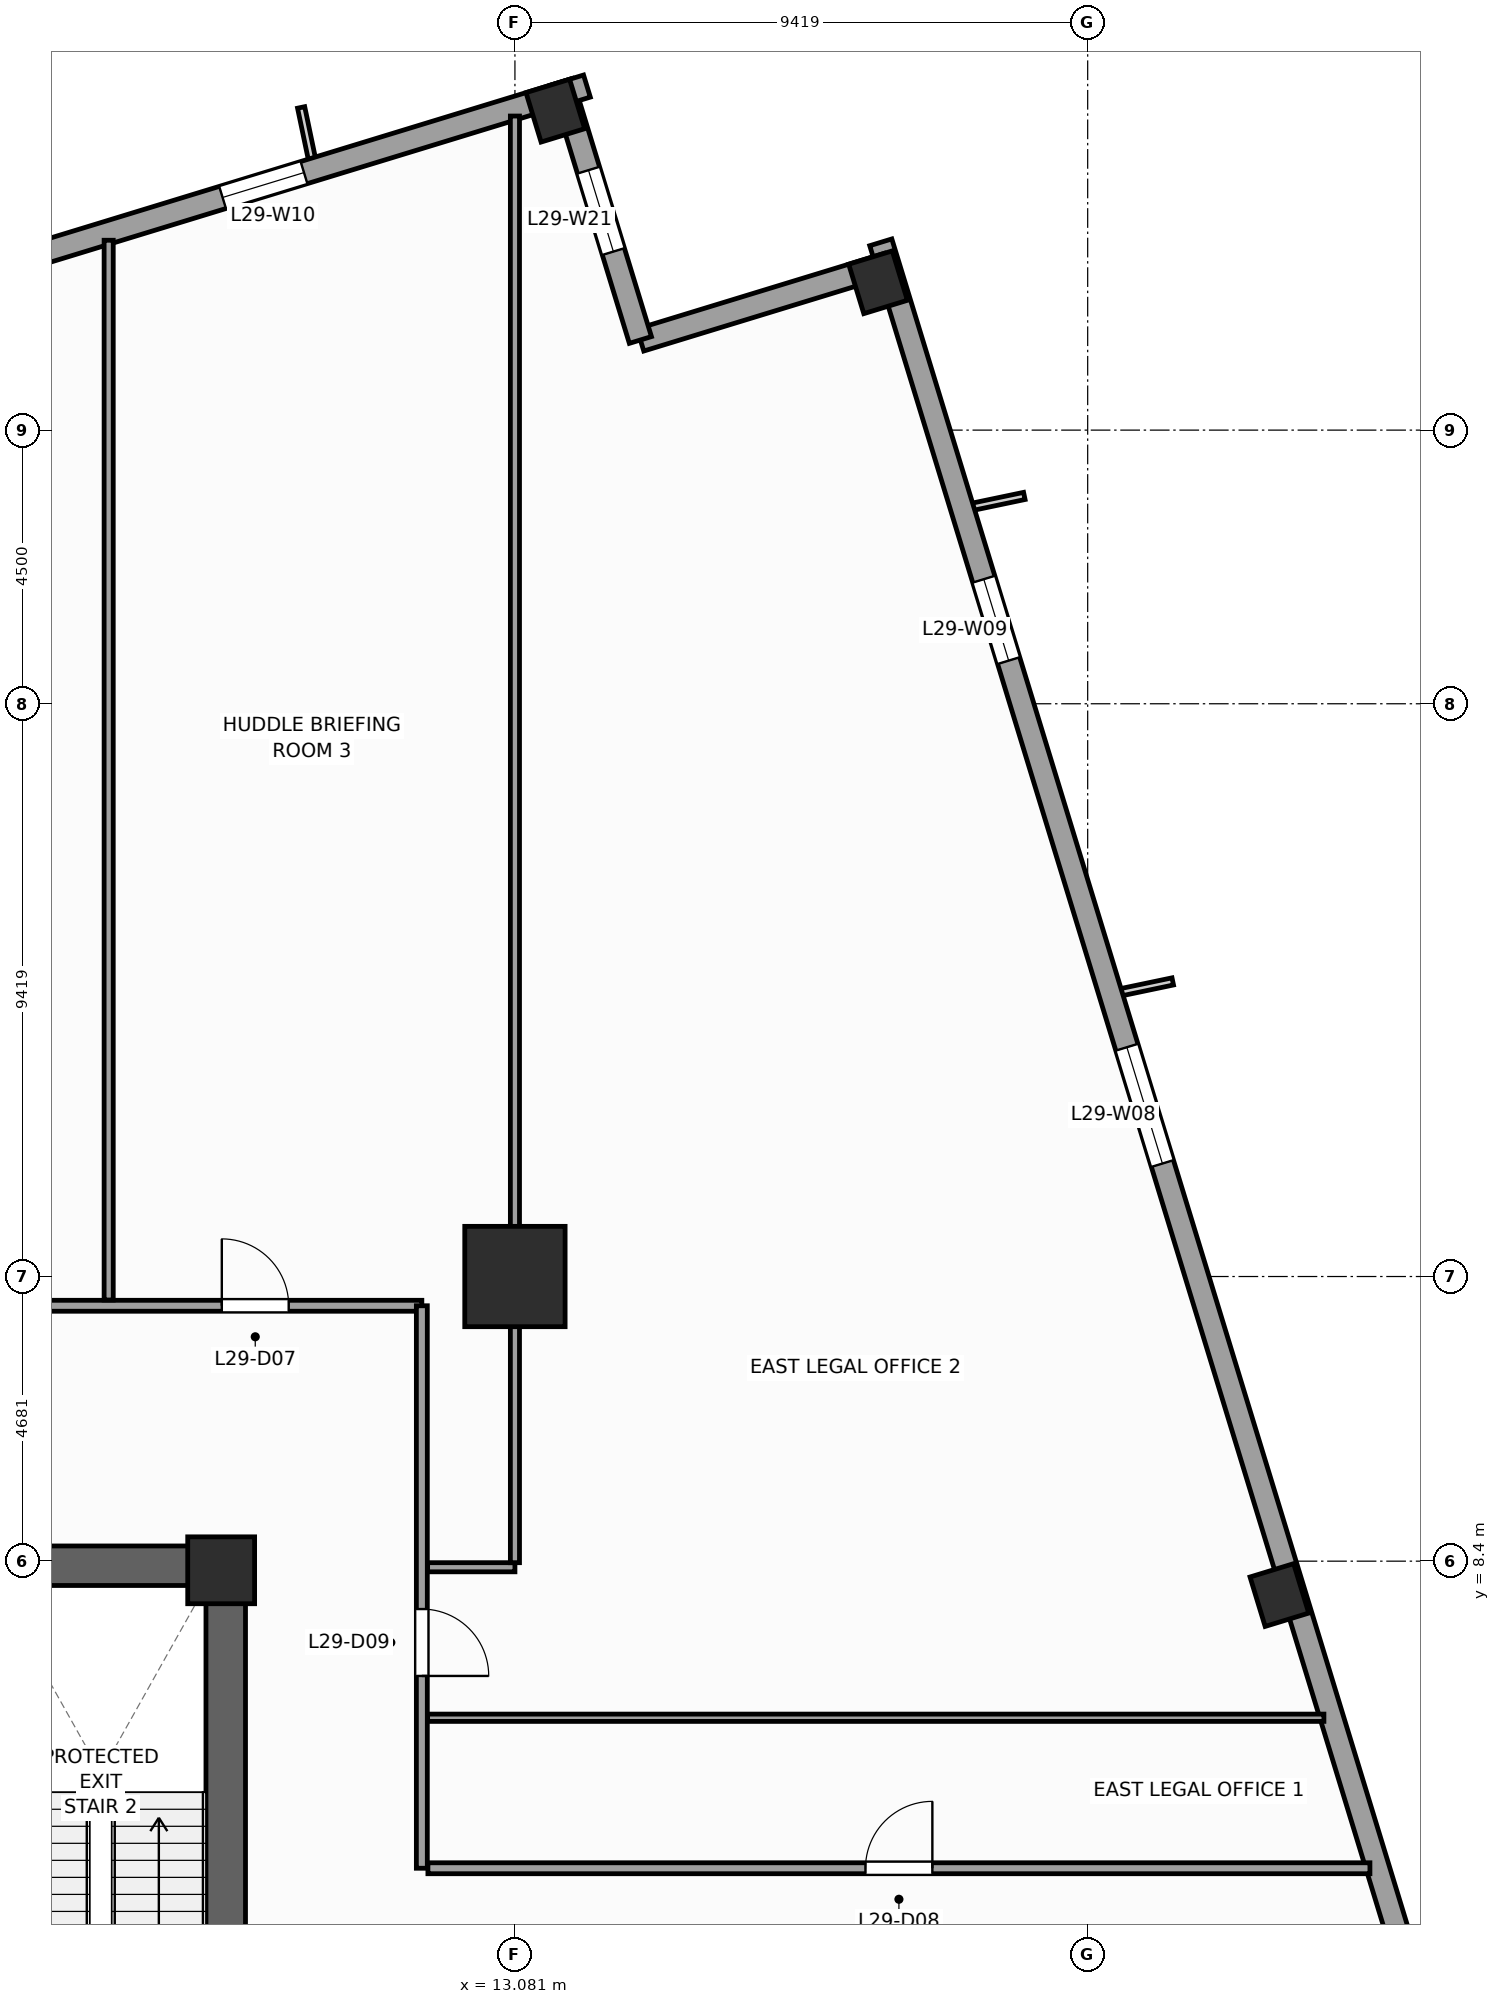
"""IFC4 building model, lengths in metres.
Left out: names, types, materials, properties, quantities, classifications, styles, units other than length and angle.
Written with IfcOpenShell. Run it as: python <this file> out.ifc"""

import sys

from ifc_helpers import new_model, si_unit, direction, frame, frame_2d, origin, origin_2d, place, context, subcontext, project, spatial, rectangle, extrude, source, transform, mapped, element, fill, save


model = new_model("IFC4")
c1 = context("Model", 3, precision=1e-05, world=origin(), true_north=direction((0.0, 1.0)))
c2 = subcontext(c1, "Body", "Model", "MODEL_VIEW")
j1 = project(units=[si_unit("LENGTHUNIT", "METRE"), si_unit("PLANEANGLEUNIT", "RADIAN")], contexts=[c1])
p1 = place(None, origin())
s1 = spatial("IfcSite", under=j1, at=p1, CompositionType="ELEMENT")
p2 = place(p1, origin())
s2 = spatial("IfcBuilding", under=s1, at=p2, CompositionType="ELEMENT")
p3 = place(p2, frame((0.0, 0.0, 123.2)))
s3 = spatial("IfcBuildingStorey", under=s2, at=p3, CompositionType="ELEMENT", Elevation=123.2)
p4 = place(p3, frame((-8.65, 8.325, 0.0), z_axis=(0.0, 0.0, 1.0), x_axis=(1.0, 0.0, 0.0)))
e1 = element("IfcWall", 1, at=p4, inside=s3, PredefinedType="SHEAR", context=c2, shape_type="SweptSolid", body=[
    extrude(rectangle(XDim=17.3, YDim=0.65, at=frame_2d((8.65, 0.0))), origin(), (0.0, 0.0, 1.0), 4.0),
])
p5 = place(p3, frame((8.325, -8.0, 0.0), z_axis=(0.0, 0.0, 1.0), x_axis=(0.0, 1.0, 0.0)))
e2 = element("IfcWall", 2, at=p5, inside=s3, PredefinedType="SHEAR", context=c2, shape_type="SweptSolid", body=[
    extrude(rectangle(XDim=16.0, YDim=0.65, at=frame_2d((8.0, 0.0))), origin(), (0.0, 0.0, 1.0), 4.0),
])
p6 = place(p5, frame((4.69, 0.0, 0.0)))
e3 = element("IfcOpeningElement", 3, at=p6, cuts=e2, PredefinedType="OPENING", context=c2, shape_type="SweptSolid", body=[
    extrude(rectangle(XDim=1.3, YDim=2.2, at=frame_2d((0.65, 1.1))), frame((0.0, 0.335, 0.0), z_axis=(0.0, -1.0, 0.0), x_axis=(1.0, 0.0, 0.0)), (0.0, 0.0, 1.0), 0.67),
])
m1 = source(origin(), c2, "Body", "SweptSolid", [
    extrude(rectangle(XDim=1.1, YDim=1.1, at=origin_2d()), origin(), (0.0, 0.0, 1.0), 4.0),
])
p7 = place(p3, frame((8.25, 8.25, 0.0), z_axis=(0.0, 0.0, 1.0), x_axis=(1.0, 0.0, 0.0)))
e4 = element("IfcColumn", 4, at=p7, inside=s3, PredefinedType="PILASTER", context=c2, shape_type="MappedRepresentation", body=[
    mapped(m1, transform((0.0, 0.0, 0.0), scale=1.0)),
])
m2 = source(origin(), c2, "Body", "SweptSolid", [
    extrude(rectangle(XDim=1.65, YDim=1.65, at=origin_2d()), origin(), (0.0, 0.0, 1.0), 4.0),
])
p8 = place(p3, frame((13.081, 13.081, 0.0), z_axis=(0.0, 0.0, 1.0), x_axis=(1.0, 0.0, 0.0)))
e5 = element("IfcColumn", 5, at=p8, inside=s3, PredefinedType="COLUMN", context=c2, shape_type="MappedRepresentation", body=[
    mapped(m2, transform((0.0, 0.0, 0.0), scale=1.0)),
])
m3 = source(origin(), c2, "Body", "SweptSolid", [
    extrude(rectangle(XDim=0.75, YDim=0.85, at=origin_2d()), origin(), (0.0, 0.0, 1.0), 4.0),
])
for number, where, z_axis, x_axis in (
    (6, (25.653, 7.843, 0.0), (0.0, 0.0, 1.0), (0.956, 0.292, 0.0)),
    (7, (19.052, 29.431, 0.0), (0.0, 0.0, 1.0), (0.956, 0.292, 0.0)),
    (8, (13.746, 32.253, 0.0), (0.0, 0.0, 1.0), (0.956, 0.292, 0.0)),
):
    element("IfcColumn", number, at=place(p3, frame(where, z_axis=z_axis, x_axis=x_axis)), inside=s3, PredefinedType="COLUMN", context=c2, shape_type="MappedRepresentation", body=[
        mapped(m3, transform((0.0, 0.0, 0.0), scale=1.0)),
    ])
p9 = place(p3, frame((32.658, -14.265, 0.0), z_axis=(0.0, 0.0, 1.0), x_axis=(-0.292373127906, 0.956304320851, 0.0)))
e9 = element("IfcWall", 9, at=p9, inside=s3, PredefinedType="STANDARD", context=c2, shape_type="SweptSolid", body=[
    extrude(rectangle(XDim=46.38, YDim=0.38, at=frame_2d((23.19, 0.0))), origin(), (0.0, 0.0, 1.0), 3.14),
])
p10 = place(p9, frame((4.865, 0.0, 0.51)))
e10 = element("IfcOpeningElement", 10, at=p10, cuts=e9, PredefinedType="OPENING", context=c2, shape_type="SweptSolid", body=[
    extrude(rectangle(XDim=1.4, YDim=2.4, at=frame_2d((0.7, 1.2))), frame((0.0, 0.2, 0.0), z_axis=(0.0, -1.0, 0.0), x_axis=(1.0, 0.0, 0.0)), (0.0, 0.0, 1.0), 0.4),
])
p11 = place(p9, frame((12.45, 0.0, 0.51)))
e11 = element("IfcOpeningElement", 11, at=p11, cuts=e9, PredefinedType="OPENING", context=c2, shape_type="SweptSolid", body=[
    extrude(rectangle(XDim=2.0, YDim=2.4, at=frame_2d((1.0, 1.2))), frame((0.0, 0.2, 0.0), z_axis=(0.0, -1.0, 0.0), x_axis=(1.0, 0.0, 0.0)), (0.0, 0.0, 1.0), 0.4),
])
p12 = place(p9, frame((30.538, 0.0, 0.51)))
e12 = element("IfcOpeningElement", 12, at=p12, cuts=e9, PredefinedType="OPENING", context=c2, shape_type="SweptSolid", body=[
    extrude(rectangle(XDim=2.0, YDim=2.4, at=frame_2d((1.0, 1.2))), frame((0.0, 0.2, 0.0), z_axis=(0.0, -1.0, 0.0), x_axis=(1.0, 0.0, 0.0)), (0.0, 0.0, 1.0), 0.4),
])
p13 = place(p9, frame((39.187, 0.0, 0.51)))
e13 = element("IfcOpeningElement", 13, at=p13, cuts=e9, PredefinedType="OPENING", context=c2, shape_type="SweptSolid", body=[
    extrude(rectangle(XDim=1.4, YDim=2.4, at=frame_2d((0.7, 1.2))), frame((0.0, 0.2, 0.0), z_axis=(0.0, -1.0, 0.0), x_axis=(1.0, 0.0, 0.0)), (0.0, 0.0, 1.0), 0.4),
])
p14 = place(p3, frame((19.208, 29.725, 0.0), z_axis=(0.0, 0.0, 1.0), x_axis=(-0.956312764915, -0.292345507338, 0.0)))
e14 = element("IfcWall", 14, at=p14, inside=s3, PredefinedType="STANDARD", context=c2, shape_type="SweptSolid", body=[
    extrude(rectangle(XDim=4.25, YDim=0.38, at=frame_2d((2.125, 0.0))), origin(), (0.0, 0.0, 1.0), 3.74),
])
p15 = place(p3, frame((15.144, 28.482, 0.0), z_axis=(0.0, 0.0, 1.0), x_axis=(-0.292373601522, 0.956304176051, 0.0)))
e15 = element("IfcWall", 15, at=p15, inside=s3, PredefinedType="STANDARD", context=c2, shape_type="SweptSolid", body=[
    extrude(rectangle(XDim=4.44, YDim=0.38, at=frame_2d((2.22, 0.0))), origin(), (0.0, 0.0, 1.0), 3.04),
])
p16 = place(p15, frame((1.52, 0.0, 0.51)))
e16 = element("IfcOpeningElement", 16, at=p16, cuts=e15, PredefinedType="OPENING", context=c2, shape_type="SweptSolid", body=[
    extrude(rectangle(XDim=1.4, YDim=2.4, at=frame_2d((0.7, 1.2))), frame((0.0, 0.2, 0.0), z_axis=(0.0, -1.0, 0.0), x_axis=(1.0, 0.0, 0.0)), (0.0, 0.0, 1.0), 0.4),
])
p17 = place(p3, frame((14.265, 32.658, 0.0), z_axis=(0.0, 0.0, 1.0), x_axis=(-0.956304320851, -0.292373127906, 0.0)))
e17 = element("IfcWall", 17, at=p17, inside=s3, PredefinedType="STANDARD", context=c2, shape_type="SweptSolid", body=[
    extrude(rectangle(XDim=46.38, YDim=0.38, at=frame_2d((23.19, 0.0))), origin(), (0.0, 0.0, 1.0), 3.14),
])
p18 = place(p17, frame((29.115, 0.0, 0.0)))
e18 = element("IfcOpeningElement", 18, at=p18, cuts=e17, PredefinedType="OPENING", context=c2, shape_type="SweptSolid", body=[
    extrude(rectangle(XDim=1.05, YDim=2.25, at=frame_2d((0.525, 1.125))), frame((0.0, 0.2, 0.0), z_axis=(0.0, -1.0, 0.0), x_axis=(1.0, 0.0, 0.0)), (0.0, 0.0, 1.0), 0.4),
])
p19 = place(p17, frame((4.865, 0.0, 0.51)))
e19 = element("IfcOpeningElement", 19, at=p19, cuts=e17, PredefinedType="OPENING", context=c2, shape_type="SweptSolid", body=[
    extrude(rectangle(XDim=1.4, YDim=2.4, at=frame_2d((0.7, 1.2))), frame((0.0, 0.2, 0.0), z_axis=(0.0, -1.0, 0.0), x_axis=(1.0, 0.0, 0.0)), (0.0, 0.0, 1.0), 0.4),
])
p20 = place(p17, frame((12.45, 0.0, 0.51)))
e20 = element("IfcOpeningElement", 20, at=p20, cuts=e17, PredefinedType="OPENING", context=c2, shape_type="SweptSolid", body=[
    extrude(rectangle(XDim=2.0, YDim=2.4, at=frame_2d((1.0, 1.2))), frame((0.0, 0.2, 0.0), z_axis=(0.0, -1.0, 0.0), x_axis=(1.0, 0.0, 0.0)), (0.0, 0.0, 1.0), 0.4),
])
p21 = place(p17, frame((20.512, 0.0, 0.51)))
e21 = element("IfcOpeningElement", 21, at=p21, cuts=e17, PredefinedType="OPENING", context=c2, shape_type="SweptSolid", body=[
    extrude(rectangle(XDim=2.0, YDim=2.4, at=frame_2d((1.0, 1.2))), frame((0.0, 0.2, 0.0), z_axis=(0.0, -1.0, 0.0), x_axis=(1.0, 0.0, 0.0)), (0.0, 0.0, 1.0), 0.4),
])
p22 = place(p17, frame((31.288, 0.0, 0.51)))
e22 = element("IfcOpeningElement", 22, at=p22, cuts=e17, PredefinedType="OPENING", context=c2, shape_type="SweptSolid", body=[
    extrude(rectangle(XDim=2.0, YDim=2.4, at=frame_2d((1.0, 1.2))), frame((0.0, 0.2, 0.0), z_axis=(0.0, -1.0, 0.0), x_axis=(1.0, 0.0, 0.0)), (0.0, 0.0, 1.0), 0.4),
])
p23 = place(p17, frame((39.187, 0.0, 0.51)))
e23 = element("IfcOpeningElement", 23, at=p23, cuts=e17, PredefinedType="OPENING", context=c2, shape_type="SweptSolid", body=[
    extrude(rectangle(XDim=1.4, YDim=2.4, at=frame_2d((0.7, 1.2))), frame((0.0, 0.2, 0.0), z_axis=(0.0, -1.0, 0.0), x_axis=(1.0, 0.0, 0.0)), (0.0, 0.0, 1.0), 0.4),
])
p24 = place(p3, frame((-10.45, 12.6, 0.0), z_axis=(0.0, 0.0, 1.0), x_axis=(1.0, 0.0, 0.0)))
e24 = element("IfcWall", 24, at=p24, inside=s3, PredefinedType="PARTITIONING", context=c2, shape_type="SweptSolid", body=[
    extrude(rectangle(XDim=22.0, YDim=0.18, at=frame_2d((11.0, 0.0))), origin(), (0.0, 0.0, 1.0), 3.74),
])
p25 = place(p24, frame((4.839, 0.0, 0.0)))
e25 = element("IfcOpeningElement", 25, at=p25, cuts=e24, PredefinedType="OPENING", context=c2, shape_type="SweptSolid", body=[
    extrude(rectangle(XDim=1.1, YDim=2.2, at=frame_2d((0.55, 1.1))), frame((0.0, 0.1, 0.0), z_axis=(0.0, -1.0, 0.0), x_axis=(1.0, 0.0, 0.0)), (0.0, 0.0, 1.0), 0.2),
])
p26 = place(p24, frame((13.1, 0.0, 0.0)))
e26 = element("IfcOpeningElement", 26, at=p26, cuts=e24, PredefinedType="OPENING", context=c2, shape_type="SweptSolid", body=[
    extrude(rectangle(XDim=1.1, YDim=2.2, at=frame_2d((0.55, 1.1))), frame((0.0, 0.1, 0.0), z_axis=(0.0, -1.0, 0.0), x_axis=(1.0, 0.0, 0.0)), (0.0, 0.0, 1.0), 0.2),
])
p27 = place(p24, frame((18.71, 0.0, 0.0)))
e27 = element("IfcOpeningElement", 27, at=p27, cuts=e24, PredefinedType="OPENING", context=c2, shape_type="SweptSolid", body=[
    extrude(rectangle(XDim=1.1, YDim=2.2, at=frame_2d((0.55, 1.1))), frame((0.0, 0.1, 0.0), z_axis=(0.0, -1.0, 0.0), x_axis=(1.0, 0.0, 0.0)), (0.0, 0.0, 1.0), 0.2),
])
p28 = place(p3, frame((11.55, 3.35, 0.0), z_axis=(0.0, 0.0, 1.0), x_axis=(0.0, 1.0, 0.0)))
e28 = element("IfcWall", 28, at=p28, inside=s3, PredefinedType="PARTITIONING", context=c2, shape_type="SweptSolid", body=[
    extrude(rectangle(XDim=9.25, YDim=0.18, at=frame_2d((4.625, 0.0))), origin(), (0.0, 0.0, 1.0), 3.74),
])
p29 = place(p28, frame((3.163, 0.0, 0.0)))
e29 = element("IfcOpeningElement", 29, at=p29, cuts=e28, PredefinedType="OPENING", context=c2, shape_type="SweptSolid", body=[
    extrude(rectangle(XDim=1.1, YDim=2.2, at=frame_2d((0.55, 1.1))), frame((0.0, 0.1, 0.0), z_axis=(0.0, -1.0, 0.0), x_axis=(1.0, 0.0, 0.0)), (0.0, 0.0, 1.0), 0.2),
])
p30 = place(p3, frame((11.65, 3.35, 0.0), z_axis=(0.0, 0.0, 1.0), x_axis=(1.0, 0.0, 0.0)))
e30 = element("IfcWall", 30, at=p30, inside=s3, PredefinedType="PARTITIONING", context=c2, shape_type="SweptSolid", body=[
    extrude(rectangle(XDim=15.492, YDim=0.18, at=frame_2d((7.746, 0.0))), origin(), (0.0, 0.0, 1.0), 3.74),
])
p31 = place(p30, frame((7.196, 0.0, 0.0)))
e31 = element("IfcOpeningElement", 31, at=p31, cuts=e30, PredefinedType="OPENING", context=c2, shape_type="SweptSolid", body=[
    extrude(rectangle(XDim=1.1, YDim=2.2, at=frame_2d((0.55, 1.1))), frame((0.0, 0.1, 0.0), z_axis=(0.0, -1.0, 0.0), x_axis=(1.0, 0.0, 0.0)), (0.0, 0.0, 1.0), 0.2),
])
p32 = place(p3, frame((6.4, 12.695, 0.0), z_axis=(0.0, 0.0, 1.0), x_axis=(0.0, 1.0, 0.0)))
e32 = element("IfcWall", 32, at=p32, inside=s3, PredefinedType="PARTITIONING", context=c2, shape_type="SweptSolid", body=[
    extrude(rectangle(XDim=17.427, YDim=0.15, at=frame_2d((8.714, 0.0))), origin(), (0.0, 0.0, 1.0), 3.74),
])
p33 = place(p3, frame((11.645, 8.3, 0.0), z_axis=(0.0, 0.0, 1.0), x_axis=(1.0, 0.0, 0.0)))
e33 = element("IfcWall", 33, at=p33, inside=s3, PredefinedType="PARTITIONING", context=c2, shape_type="SweptSolid", body=[
    extrude(rectangle(XDim=1.436, YDim=0.15, at=frame_2d((0.718, 0.0))), origin(), (0.0, 0.0, 1.0), 3.74),
])
p34 = place(p3, frame((13.081, 8.375, 0.0), z_axis=(0.0, 0.0, 1.0), x_axis=(0.0, 1.0, 0.0)))
e34 = element("IfcWall", 34, at=p34, inside=s3, PredefinedType="PARTITIONING", context=c2, shape_type="SweptSolid", body=[
    extrude(rectangle(XDim=23.79, YDim=0.15, at=frame_2d((11.895, 0.0))), origin(), (0.0, 0.0, 1.0), 2.732),
])
p35 = place(p3, frame((11.645, 5.825, 0.0), z_axis=(0.0, 0.0, 1.0), x_axis=(1.0, 0.0, 0.0)))
e35 = element("IfcWall", 35, at=p35, inside=s3, PredefinedType="PARTITIONING", context=c2, shape_type="SweptSolid", body=[
    extrude(rectangle(XDim=14.74, YDim=0.12, at=frame_2d((7.37, 0.0))), origin(), (0.0, 0.0, 1.0), 3.74),
])
m4 = source(origin(), c2, "Body", "SweptSolid", [
    extrude(rectangle(XDim=2.0, YDim=2.4, at=frame_2d((1.0, 1.2))), frame((0.0, 0.03, 0.0), z_axis=(0.0, -1.0, 0.0), x_axis=(1.0, 0.0, 0.0)), (0.0, 0.0, 1.0), 0.06),
])
p36 = place(p12, origin())
e36 = element("IfcWindow", 36, at=p36, inside=s3, PartitioningType="SINGLE_PANEL", PredefinedType="WINDOW", context=c2, shape_type="MappedRepresentation", body=[
    mapped(m4, transform((0.0, 0.0, 0.0), scale=1.0)),
])
fill(e12, e36)
m5 = source(origin(), c2, "Body", "SweptSolid", [
    extrude(rectangle(XDim=1.4, YDim=2.4, at=frame_2d((0.7, 1.2))), frame((0.0, 0.03, 0.0), z_axis=(0.0, -1.0, 0.0), x_axis=(1.0, 0.0, 0.0)), (0.0, 0.0, 1.0), 0.06),
])
p37 = place(p13, origin())
e37 = element("IfcWindow", 37, at=p37, inside=s3, PartitioningType="SINGLE_PANEL", PredefinedType="WINDOW", context=c2, shape_type="MappedRepresentation", body=[
    mapped(m5, transform((0.0, 0.0, 0.0), scale=1.0)),
])
fill(e13, e37)
p38 = place(p19, origin())
e38 = element("IfcWindow", 38, at=p38, inside=s3, PartitioningType="SINGLE_PANEL", PredefinedType="WINDOW", context=c2, shape_type="MappedRepresentation", body=[
    mapped(m5, transform((0.0, 0.0, 0.0), scale=1.0)),
])
fill(e19, e38)
p39 = place(p16, origin())
e39 = element("IfcWindow", 39, at=p39, inside=s3, PartitioningType="SINGLE_PANEL", PredefinedType="WINDOW", context=c2, shape_type="MappedRepresentation", body=[
    mapped(m5, transform((0.0, 0.0, 0.0), scale=1.0)),
])
fill(e16, e39)
m6 = source(origin(), c2, "Body", "SweptSolid", [
    extrude(rectangle(XDim=1.1, YDim=2.2, at=frame_2d((0.55, 1.1))), frame((0.0, 0.025, 0.0), z_axis=(0.0, -1.0, 0.0), x_axis=(1.0, 0.0, 0.0)), (0.0, 0.0, 1.0), 0.05),
])
p40 = place(p27, origin())
e40 = element("IfcDoor", 40, at=p40, inside=s3, OperationType="SINGLE_SWING_LEFT", PredefinedType="DOOR", context=c2, shape_type="MappedRepresentation", body=[
    mapped(m6, transform((0.0, 0.0, 0.0), scale=1.0)),
])
fill(e27, e40)
p41 = place(p31, origin())
e41 = element("IfcDoor", 41, at=p41, inside=s3, OperationType="SINGLE_SWING_RIGHT", PredefinedType="DOOR", context=c2, shape_type="MappedRepresentation", body=[
    mapped(m6, transform((0.0, 0.0, 0.0), scale=1.0)),
])
fill(e31, e41)
p42 = place(p29, frame((1.1, 0.0, 0.0), z_axis=(0.0, 0.0, 1.0), x_axis=(-1.0, 0.0, 0.0)))
e42 = element("IfcDoor", 42, at=p42, inside=s3, OperationType="SINGLE_SWING_LEFT", PredefinedType="DOOR", context=c2, shape_type="MappedRepresentation", body=[
    mapped(m6, transform((0.0, 0.0, 0.0), scale=1.0)),
])
fill(e29, e42)
save(model, sys.argv[1])
